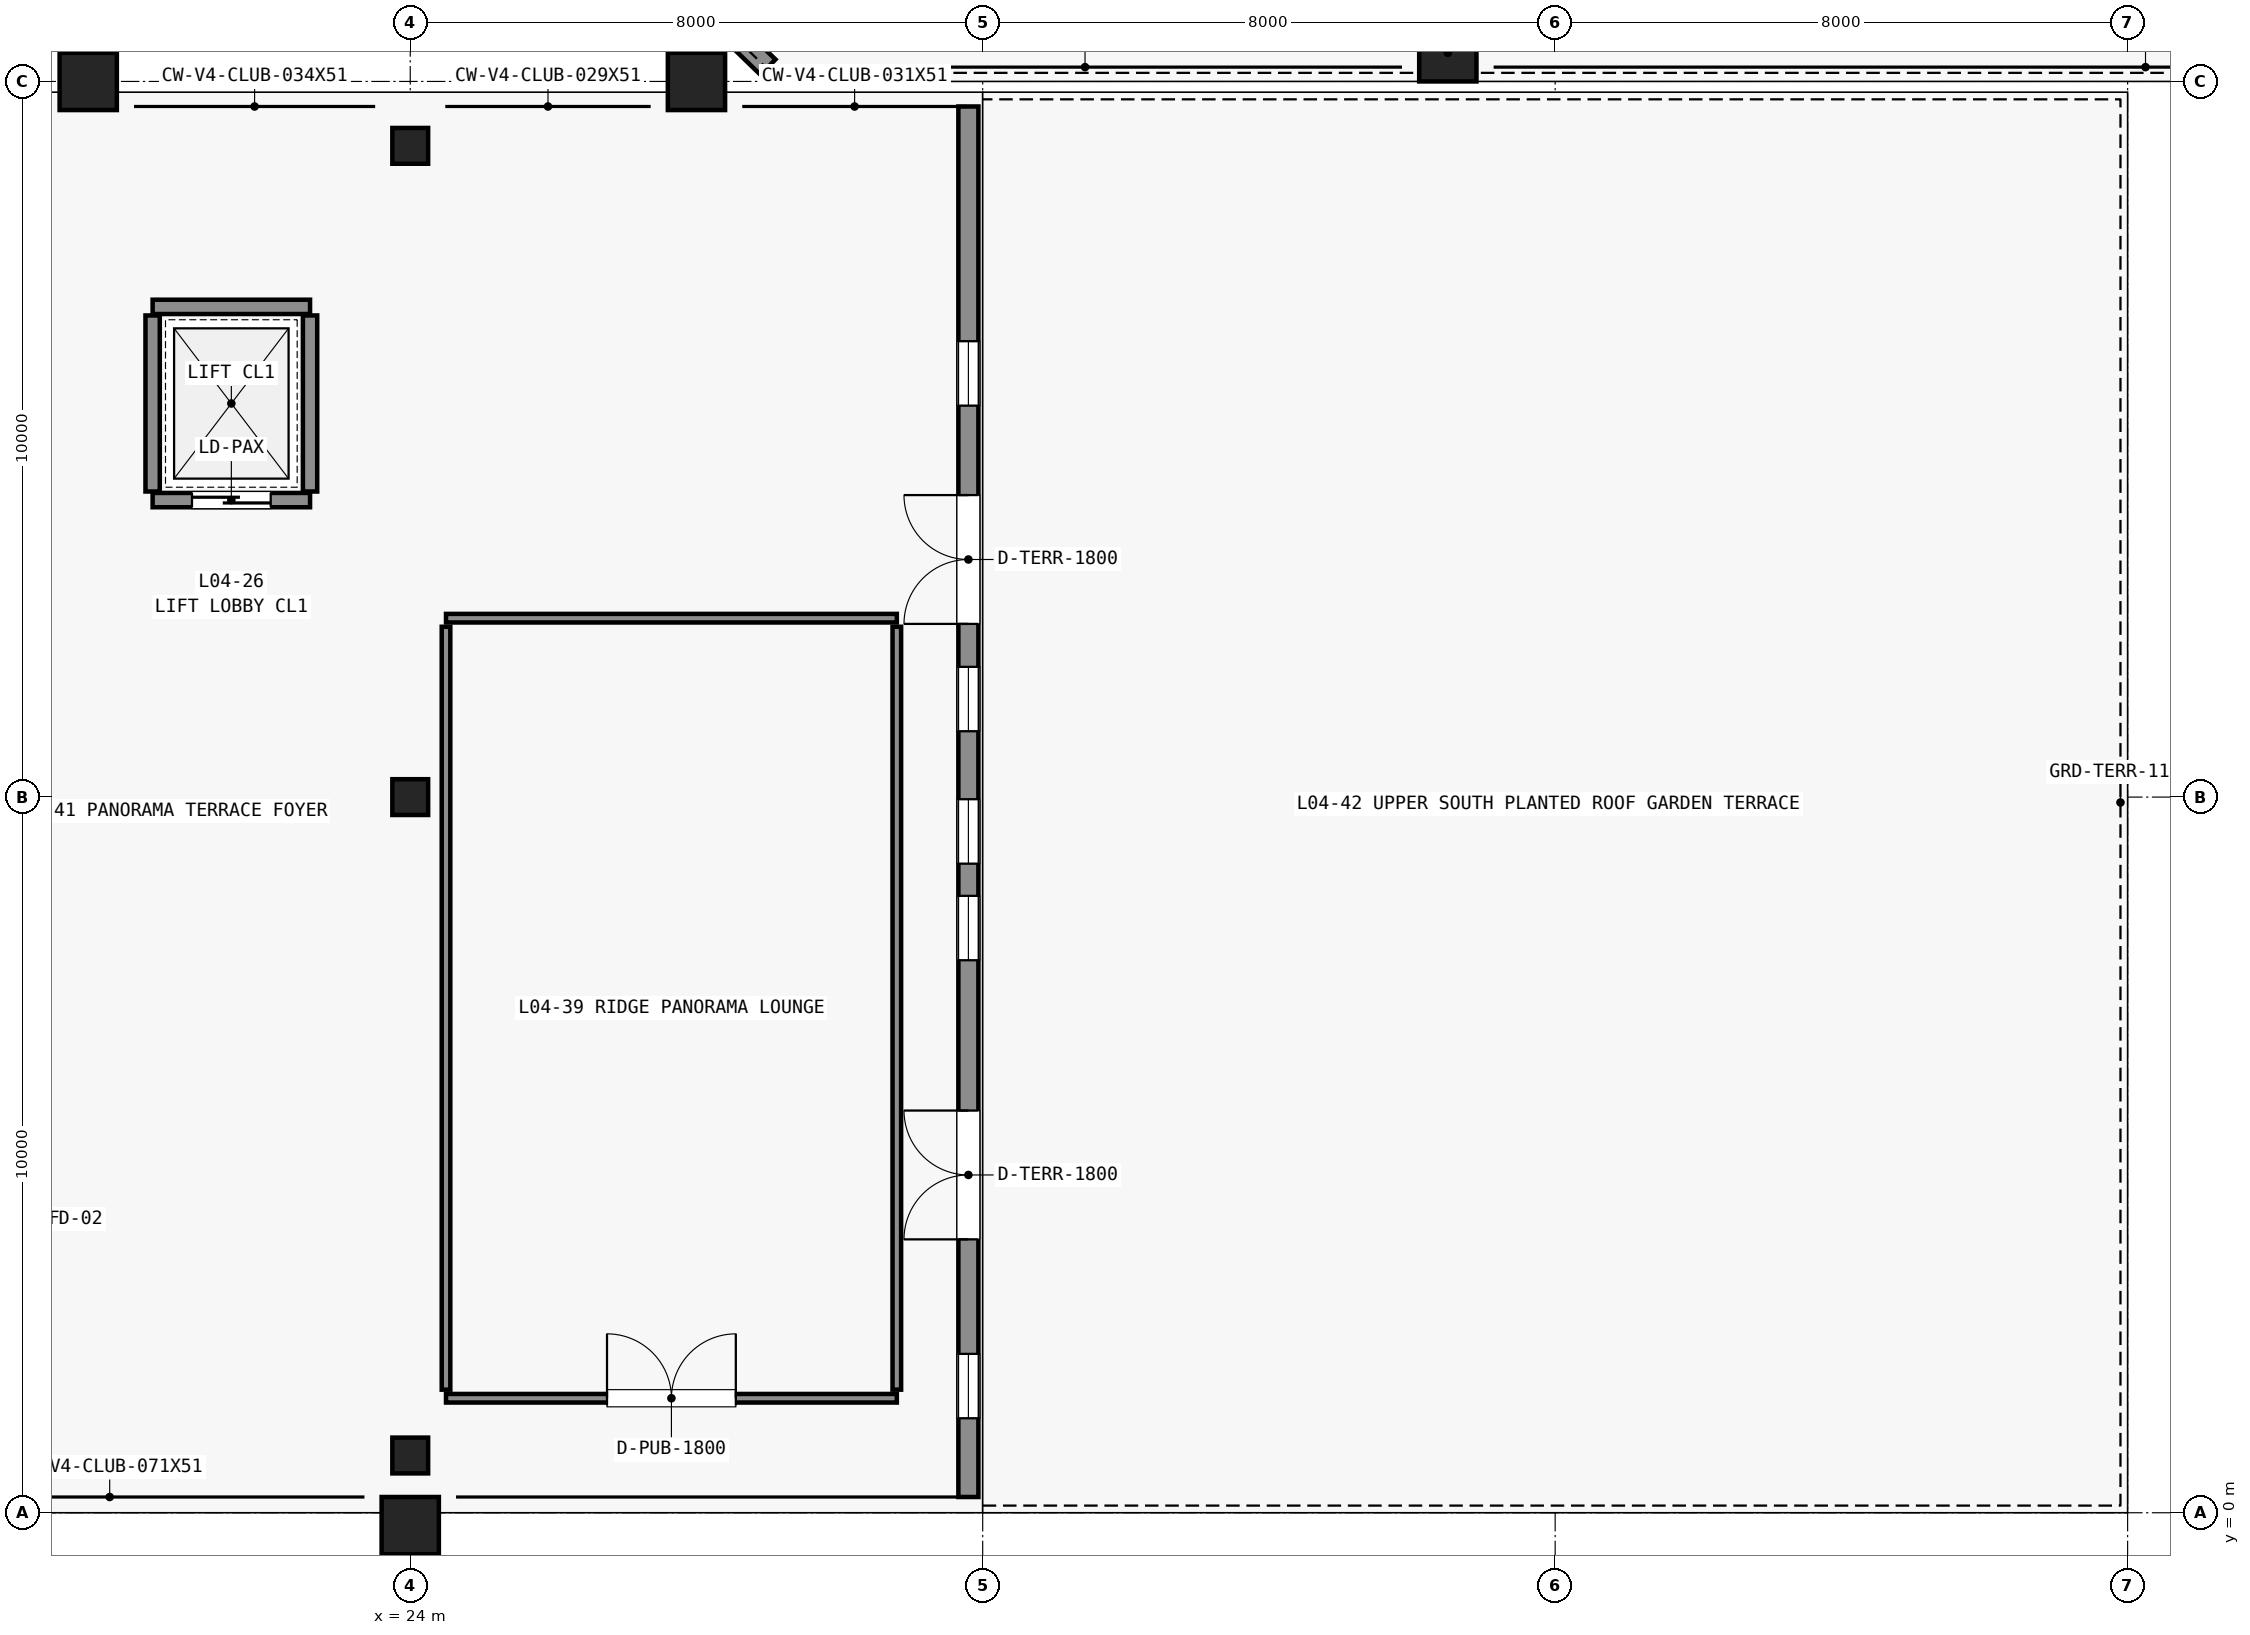
"""IFC4 building model, lengths in metres.
Left out: names, types, materials, properties, quantities, classifications, styles, units other than length and angle.
Written with IfcOpenShell. Run it as: python <this file> out.ifc"""

import sys

from ifc_helpers import new_model, si_unit, direction, frame, frame_2d, origin, origin_2d, place, context, subcontext, project, spatial, rectangle, extrude, element, fill, save


model = new_model("IFC4")
c1 = context("Model", 3, precision=1e-05, world=origin(), true_north=direction((0.0, 1.0)))
c2 = subcontext(c1, "Body", "Model", "MODEL_VIEW")
j1 = project(units=[si_unit("LENGTHUNIT", "METRE"), si_unit("PLANEANGLEUNIT", "RADIAN")], contexts=[c1])
p1 = place(None, origin())
s1 = spatial("IfcSite", under=j1, at=p1, CompositionType="ELEMENT")
p2 = place(p1, origin())
s2 = spatial("IfcBuilding", under=s1, at=p2, CompositionType="ELEMENT")
p3 = place(p2, frame((0.0, 0.0, 21.0)))
s3 = spatial("IfcBuildingStorey", under=s2, at=p3, CompositionType="ELEMENT", Elevation=21.0)
p4 = place(p3, frame((38.5, 20.4, 0.0), z_axis=(0.0, 0.0, 1.0), x_axis=(1.0, 0.0, 0.0)))
e1 = element("IfcColumn", 1, at=p4, inside=s3, PredefinedType="PILASTER", context=c2, shape_type="SweptSolid", body=[
    extrude(rectangle(XDim=0.8, YDim=0.8, at=origin_2d()), origin(), (0.0, 0.0, 1.0), 5.06),
])
for number, where, z_axis, x_axis in (
    (2, (24.0, -0.18, 0.0), (0.0, 0.0, 1.0), (1.0, 0.0, 0.0)),
    (3, (19.5, 20.0, 0.0), (0.0, 0.0, 1.0), (1.0, 0.0, 0.0)),
    (4, (28.0, 20.0, 0.0), (0.0, 0.0, 1.0), (1.0, 0.0, 0.0)),
):
    element("IfcColumn", number, at=place(p3, frame(where, z_axis=z_axis, x_axis=x_axis)), inside=s3, PredefinedType="PILASTER", context=c2, shape_type="SweptSolid", body=[
        extrude(rectangle(XDim=0.8, YDim=0.8, at=origin_2d()), origin(), (0.0, 0.0, 1.0), 5.08),
    ])
for number, where, z_axis, x_axis in (
    (5, (24.0, 0.8, 0.0), (0.0, 0.0, 1.0), (1.0, 0.0, 0.0)),
    (6, (24.0, 10.0, 0.0), (0.0, 0.0, 1.0), (1.0, 0.0, 0.0)),
    (7, (24.0, 19.1, 0.0), (0.0, 0.0, 1.0), (1.0, 0.0, 0.0)),
):
    element("IfcColumn", number, at=place(p3, frame(where, z_axis=z_axis, x_axis=x_axis)), inside=s3, PredefinedType="COLUMN", context=c2, shape_type="SweptSolid", body=[
        extrude(rectangle(XDim=0.5, YDim=0.5, at=origin_2d()), origin(), (0.0, 0.0, 1.0), 5.08),
    ])
p5 = place(p3, frame((20.4, 14.15, 0.0), z_axis=(0.0, 0.0, 1.0), x_axis=(1.0, 0.0, 0.0)))
e8 = element("IfcWall", 8, at=p5, inside=s3, PredefinedType="STANDARD", context=c2, shape_type="SweptSolid", body=[
    extrude(rectangle(XDim=2.2, YDim=0.2, at=frame_2d((1.1, 0.0))), origin(), (0.0, 0.0, 1.0), 5.08),
])
p6 = place(p5, frame((0.55, 0.0, 0.0)))
e9 = element("IfcOpeningElement", 9, at=p6, cuts=e8, PredefinedType="OPENING", context=c2, shape_type="SweptSolid", body=[
    extrude(rectangle(XDim=1.1, YDim=2.15, at=frame_2d((0.55, 1.075))), frame((0.0, 0.11, 0.0), z_axis=(0.0, -1.0, 0.0), x_axis=(1.0, 0.0, 0.0)), (0.0, 0.0, 1.0), 0.22),
])
p7 = place(p3, frame((20.4, 16.85, 0.0), z_axis=(0.0, 0.0, 1.0), x_axis=(1.0, 0.0, 0.0)))
e10 = element("IfcWall", 10, at=p7, inside=s3, PredefinedType="STANDARD", context=c2, shape_type="SweptSolid", body=[
    extrude(rectangle(XDim=2.2, YDim=0.2, at=frame_2d((1.1, 0.0))), origin(), (0.0, 0.0, 1.0), 5.08),
])
for number, where, z_axis, x_axis in (
    (11, (20.4, 14.27, 0.0), (0.0, 0.0, 1.0), (0.0, 1.0, 0.0)),
    (12, (22.6, 14.27, 0.0), (0.0, 0.0, 1.0), (0.0, 1.0, 0.0)),
):
    element("IfcWall", number, at=place(p3, frame(where, z_axis=z_axis, x_axis=x_axis)), inside=s3, PredefinedType="STANDARD", context=c2, shape_type="SweptSolid", body=[
        extrude(rectangle(XDim=2.46, YDim=0.2, at=frame_2d((1.23, 0.0))), origin(), (0.0, 0.0, 1.0), 5.08),
    ])
p8 = place(p3, frame((16.2, 32.6, 0.0), z_axis=(0.0, 0.0, 1.0), x_axis=(0.718237441527, -0.695798086796, 0.0)))
e13 = element("IfcWall", 13, at=p8, inside=s3, PredefinedType="STANDARD", context=c2, shape_type="SweptSolid", body=[
    extrude(rectangle(XDim=17.822, YDim=0.3, at=frame_2d((8.911, 0.0))), origin(), (0.0, 0.0, 1.0), 4.21),
])
p9 = place(p8, frame((1.1, 0.0, 0.95)))
e14 = element("IfcOpeningElement", 14, at=p9, cuts=e13, PredefinedType="OPENING", context=c2, shape_type="SweptSolid", body=[
    extrude(rectangle(XDim=0.9, YDim=2.85, at=frame_2d((0.45, 1.425))), frame((0.0, 0.16, 0.0), z_axis=(0.0, -1.0, 0.0), x_axis=(1.0, 0.0, 0.0)), (0.0, 0.0, 1.0), 0.32),
])
p10 = place(p8, frame((2.45, 0.0, 0.95)))
e15 = element("IfcOpeningElement", 15, at=p10, cuts=e13, PredefinedType="OPENING", context=c2, shape_type="SweptSolid", body=[
    extrude(rectangle(XDim=0.9, YDim=2.85, at=frame_2d((0.45, 1.425))), frame((0.0, 0.16, 0.0), z_axis=(0.0, -1.0, 0.0), x_axis=(1.0, 0.0, 0.0)), (0.0, 0.0, 1.0), 0.32),
])
p11 = place(p8, frame((4.3, 0.0, 0.95)))
e16 = element("IfcOpeningElement", 16, at=p11, cuts=e13, PredefinedType="OPENING", context=c2, shape_type="SweptSolid", body=[
    extrude(rectangle(XDim=0.9, YDim=2.85, at=frame_2d((0.45, 1.425))), frame((0.0, 0.16, 0.0), z_axis=(0.0, -1.0, 0.0), x_axis=(1.0, 0.0, 0.0)), (0.0, 0.0, 1.0), 0.32),
])
p12 = place(p8, frame((5.65, 0.0, 0.95)))
e17 = element("IfcOpeningElement", 17, at=p12, cuts=e13, PredefinedType="OPENING", context=c2, shape_type="SweptSolid", body=[
    extrude(rectangle(XDim=0.9, YDim=2.85, at=frame_2d((0.45, 1.425))), frame((0.0, 0.16, 0.0), z_axis=(0.0, -1.0, 0.0), x_axis=(1.0, 0.0, 0.0)), (0.0, 0.0, 1.0), 0.32),
])
p13 = place(p8, frame((7.5, 0.0, 0.95)))
e18 = element("IfcOpeningElement", 18, at=p13, cuts=e13, PredefinedType="OPENING", context=c2, shape_type="SweptSolid", body=[
    extrude(rectangle(XDim=0.9, YDim=2.85, at=frame_2d((0.45, 1.425))), frame((0.0, 0.16, 0.0), z_axis=(0.0, -1.0, 0.0), x_axis=(1.0, 0.0, 0.0)), (0.0, 0.0, 1.0), 0.32),
])
p14 = place(p8, frame((8.85, 0.0, 0.95)))
e19 = element("IfcOpeningElement", 19, at=p14, cuts=e13, PredefinedType="OPENING", context=c2, shape_type="SweptSolid", body=[
    extrude(rectangle(XDim=0.9, YDim=2.85, at=frame_2d((0.45, 1.425))), frame((0.0, 0.16, 0.0), z_axis=(0.0, -1.0, 0.0), x_axis=(1.0, 0.0, 0.0)), (0.0, 0.0, 1.0), 0.32),
])
p15 = place(p8, frame((10.7, 0.0, 0.95)))
e20 = element("IfcOpeningElement", 20, at=p15, cuts=e13, PredefinedType="OPENING", context=c2, shape_type="SweptSolid", body=[
    extrude(rectangle(XDim=0.9, YDim=2.85, at=frame_2d((0.45, 1.425))), frame((0.0, 0.16, 0.0), z_axis=(0.0, -1.0, 0.0), x_axis=(1.0, 0.0, 0.0)), (0.0, 0.0, 1.0), 0.32),
])
p16 = place(p8, frame((12.05, 0.0, 0.95)))
e21 = element("IfcOpeningElement", 21, at=p16, cuts=e13, PredefinedType="OPENING", context=c2, shape_type="SweptSolid", body=[
    extrude(rectangle(XDim=0.9, YDim=2.85, at=frame_2d((0.45, 1.425))), frame((0.0, 0.16, 0.0), z_axis=(0.0, -1.0, 0.0), x_axis=(1.0, 0.0, 0.0)), (0.0, 0.0, 1.0), 0.32),
])
p17 = place(p8, frame((13.9, 0.0, 0.95)))
e22 = element("IfcOpeningElement", 22, at=p17, cuts=e13, PredefinedType="OPENING", context=c2, shape_type="SweptSolid", body=[
    extrude(rectangle(XDim=0.9, YDim=2.85, at=frame_2d((0.45, 1.425))), frame((0.0, 0.16, 0.0), z_axis=(0.0, -1.0, 0.0), x_axis=(1.0, 0.0, 0.0)), (0.0, 0.0, 1.0), 0.32),
])
p18 = place(p8, frame((15.25, 0.0, 0.95)))
e23 = element("IfcOpeningElement", 23, at=p18, cuts=e13, PredefinedType="OPENING", context=c2, shape_type="SweptSolid", body=[
    extrude(rectangle(XDim=0.9, YDim=2.85, at=frame_2d((0.45, 1.425))), frame((0.0, 0.16, 0.0), z_axis=(0.0, -1.0, 0.0), x_axis=(1.0, 0.0, 0.0)), (0.0, 0.0, 1.0), 0.32),
])
p19 = place(p3, frame((31.8, 0.22, 0.0), z_axis=(0.0, 0.0, 1.0), x_axis=(0.0, 1.0, 0.0)))
e24 = element("IfcWall", 24, at=p19, inside=s3, PredefinedType="STANDARD", context=c2, shape_type="SweptSolid", body=[
    extrude(rectangle(XDim=19.43, YDim=0.28, at=frame_2d((9.715, 0.0))), origin(), (0.0, 0.0, 1.0), 5.08),
])
p20 = place(p19, frame((3.6, 0.0, 0.0)))
e25 = element("IfcOpeningElement", 25, at=p20, cuts=e24, PredefinedType="OPENING", context=c2, shape_type="SweptSolid", body=[
    extrude(rectangle(XDim=1.8, YDim=2.3, at=frame_2d((0.9, 1.15))), frame((0.0, 0.15, 0.0), z_axis=(0.0, -1.0, 0.0), x_axis=(1.0, 0.0, 0.0)), (0.0, 0.0, 1.0), 0.3),
])
p21 = place(p19, frame((12.2, 0.0, 0.0)))
e26 = element("IfcOpeningElement", 26, at=p21, cuts=e24, PredefinedType="OPENING", context=c2, shape_type="SweptSolid", body=[
    extrude(rectangle(XDim=1.8, YDim=2.3, at=frame_2d((0.9, 1.15))), frame((0.0, 0.15, 0.0), z_axis=(0.0, -1.0, 0.0), x_axis=(1.0, 0.0, 0.0)), (0.0, 0.0, 1.0), 0.3),
])
p22 = place(p19, frame((1.1, 0.0, 0.95)))
e27 = element("IfcOpeningElement", 27, at=p22, cuts=e24, PredefinedType="OPENING", context=c2, shape_type="SweptSolid", body=[
    extrude(rectangle(XDim=0.9, YDim=2.85, at=frame_2d((0.45, 1.425))), frame((0.0, 0.15, 0.0), z_axis=(0.0, -1.0, 0.0), x_axis=(1.0, 0.0, 0.0)), (0.0, 0.0, 1.0), 0.3),
])
p23 = place(p19, frame((7.5, 0.0, 0.95)))
e28 = element("IfcOpeningElement", 28, at=p23, cuts=e24, PredefinedType="OPENING", context=c2, shape_type="SweptSolid", body=[
    extrude(rectangle(XDim=0.9, YDim=2.85, at=frame_2d((0.45, 1.425))), frame((0.0, 0.15, 0.0), z_axis=(0.0, -1.0, 0.0), x_axis=(1.0, 0.0, 0.0)), (0.0, 0.0, 1.0), 0.3),
])
p24 = place(p19, frame((8.85, 0.0, 0.95)))
e29 = element("IfcOpeningElement", 29, at=p24, cuts=e24, PredefinedType="OPENING", context=c2, shape_type="SweptSolid", body=[
    extrude(rectangle(XDim=0.9, YDim=2.85, at=frame_2d((0.45, 1.425))), frame((0.0, 0.15, 0.0), z_axis=(0.0, -1.0, 0.0), x_axis=(1.0, 0.0, 0.0)), (0.0, 0.0, 1.0), 0.3),
])
p25 = place(p19, frame((10.7, 0.0, 0.95)))
e30 = element("IfcOpeningElement", 30, at=p25, cuts=e24, PredefinedType="OPENING", context=c2, shape_type="SweptSolid", body=[
    extrude(rectangle(XDim=0.9, YDim=2.85, at=frame_2d((0.45, 1.425))), frame((0.0, 0.15, 0.0), z_axis=(0.0, -1.0, 0.0), x_axis=(1.0, 0.0, 0.0)), (0.0, 0.0, 1.0), 0.3),
])
p26 = place(p19, frame((15.25, 0.0, 0.95)))
e31 = element("IfcOpeningElement", 31, at=p26, cuts=e24, PredefinedType="OPENING", context=c2, shape_type="SweptSolid", body=[
    extrude(rectangle(XDim=0.9, YDim=2.85, at=frame_2d((0.45, 1.425))), frame((0.0, 0.15, 0.0), z_axis=(0.0, -1.0, 0.0), x_axis=(1.0, 0.0, 0.0)), (0.0, 0.0, 1.0), 0.3),
])
p27 = place(p3, frame((24.5, 1.6, 0.0), z_axis=(0.0, 0.0, 1.0), x_axis=(1.0, 0.0, 0.0)))
e32 = element("IfcWall", 32, at=p27, inside=s3, PredefinedType="PARTITIONING", context=c2, shape_type="SweptSolid", body=[
    extrude(rectangle(XDim=6.3, YDim=0.12, at=frame_2d((3.15, 0.0))), origin(), (0.0, 0.0, 1.0), 4.33),
])
p28 = place(p27, frame((2.25, 0.0, 0.0)))
e33 = element("IfcOpeningElement", 33, at=p28, cuts=e32, PredefinedType="OPENING", context=c2, shape_type="SweptSolid", body=[
    extrude(rectangle(XDim=1.8, YDim=2.35, at=frame_2d((0.9, 1.175))), frame((0.0, 0.07, 0.0), z_axis=(0.0, -1.0, 0.0), x_axis=(1.0, 0.0, 0.0)), (0.0, 0.0, 1.0), 0.14),
])
p29 = place(p3, frame((24.5, 12.5, 0.0), z_axis=(0.0, 0.0, 1.0), x_axis=(1.0, 0.0, 0.0)))
e34 = element("IfcWall", 34, at=p29, inside=s3, PredefinedType="PARTITIONING", context=c2, shape_type="SweptSolid", body=[
    extrude(rectangle(XDim=6.3, YDim=0.12, at=frame_2d((3.15, 0.0))), origin(), (0.0, 0.0, 1.0), 4.33),
])
p30 = place(p3, frame((24.5, 1.72, 0.0), z_axis=(0.0, 0.0, 1.0), x_axis=(0.0, 1.0, 0.0)))
e35 = element("IfcWall", 35, at=p30, inside=s3, PredefinedType="PARTITIONING", context=c2, shape_type="SweptSolid", body=[
    extrude(rectangle(XDim=10.66, YDim=0.12, at=frame_2d((5.33, 0.0))), origin(), (0.0, 0.0, 1.0), 4.33),
])
p31 = place(p3, frame((30.8, 1.72, 0.0), z_axis=(0.0, 0.0, 1.0), x_axis=(0.0, 1.0, 0.0)))
e36 = element("IfcWall", 36, at=p31, inside=s3, PredefinedType="PARTITIONING", context=c2, shape_type="SweptSolid", body=[
    extrude(rectangle(XDim=10.66, YDim=0.12, at=frame_2d((5.33, 0.0))), origin(), (0.0, 0.0, 1.0), 5.08),
])
p32 = place(p6, origin())
e37 = element("IfcDoor", 37, at=p32, inside=s3, OperationType="SLIDING_TO_LEFT", PredefinedType="DOOR", context=c2, shape_type="SweptSolid", body=[
    extrude(rectangle(XDim=1.1, YDim=2.15, at=frame_2d((0.55, 1.075))), frame((0.0, 0.025, 0.0), z_axis=(0.0, -1.0, 0.0), x_axis=(1.0, 0.0, 0.0)), (0.0, 0.0, 1.0), 0.05),
])
fill(e9, e37)
p33 = place(p20, origin())
e38 = element("IfcDoor", 38, at=p33, inside=s3, OperationType="DOUBLE_DOOR_SINGLE_SWING", PredefinedType="DOOR", context=c2, shape_type="SweptSolid", body=[
    extrude(rectangle(XDim=1.8, YDim=2.3, at=frame_2d((0.9, 1.15))), frame((0.0, 0.025, 0.0), z_axis=(0.0, -1.0, 0.0), x_axis=(1.0, 0.0, 0.0)), (0.0, 0.0, 1.0), 0.05),
])
fill(e25, e38)
p34 = place(p21, origin())
e39 = element("IfcDoor", 39, at=p34, inside=s3, OperationType="DOUBLE_DOOR_SINGLE_SWING", PredefinedType="DOOR", context=c2, shape_type="SweptSolid", body=[
    extrude(rectangle(XDim=1.8, YDim=2.3, at=frame_2d((0.9, 1.15))), frame((0.0, 0.025, 0.0), z_axis=(0.0, -1.0, 0.0), x_axis=(1.0, 0.0, 0.0)), (0.0, 0.0, 1.0), 0.05),
])
fill(e26, e39)
p35 = place(p22, origin())
e40 = element("IfcWindow", 40, at=p35, inside=s3, PartitioningType="DOUBLE_PANEL_VERTICAL", PredefinedType="WINDOW", context=c2, shape_type="SweptSolid", body=[
    extrude(rectangle(XDim=0.9, YDim=2.85, at=frame_2d((0.45, 1.425))), frame((0.0, 0.03, 0.0), z_axis=(0.0, -1.0, 0.0), x_axis=(1.0, 0.0, 0.0)), (0.0, 0.0, 1.0), 0.06),
])
fill(e27, e40)
p36 = place(p23, origin())
e41 = element("IfcWindow", 41, at=p36, inside=s3, PartitioningType="DOUBLE_PANEL_VERTICAL", PredefinedType="WINDOW", context=c2, shape_type="SweptSolid", body=[
    extrude(rectangle(XDim=0.9, YDim=2.85, at=frame_2d((0.45, 1.425))), frame((0.0, 0.03, 0.0), z_axis=(0.0, -1.0, 0.0), x_axis=(1.0, 0.0, 0.0)), (0.0, 0.0, 1.0), 0.06),
])
fill(e28, e41)
p37 = place(p24, origin())
e42 = element("IfcWindow", 42, at=p37, inside=s3, PartitioningType="DOUBLE_PANEL_VERTICAL", PredefinedType="WINDOW", context=c2, shape_type="SweptSolid", body=[
    extrude(rectangle(XDim=0.9, YDim=2.85, at=frame_2d((0.45, 1.425))), frame((0.0, 0.03, 0.0), z_axis=(0.0, -1.0, 0.0), x_axis=(1.0, 0.0, 0.0)), (0.0, 0.0, 1.0), 0.06),
])
fill(e29, e42)
p38 = place(p25, origin())
e43 = element("IfcWindow", 43, at=p38, inside=s3, PartitioningType="DOUBLE_PANEL_VERTICAL", PredefinedType="WINDOW", context=c2, shape_type="SweptSolid", body=[
    extrude(rectangle(XDim=0.9, YDim=2.85, at=frame_2d((0.45, 1.425))), frame((0.0, 0.03, 0.0), z_axis=(0.0, -1.0, 0.0), x_axis=(1.0, 0.0, 0.0)), (0.0, 0.0, 1.0), 0.06),
])
fill(e30, e43)
p39 = place(p26, origin())
e44 = element("IfcWindow", 44, at=p39, inside=s3, PartitioningType="DOUBLE_PANEL_VERTICAL", PredefinedType="WINDOW", context=c2, shape_type="SweptSolid", body=[
    extrude(rectangle(XDim=0.9, YDim=2.85, at=frame_2d((0.45, 1.425))), frame((0.0, 0.03, 0.0), z_axis=(0.0, -1.0, 0.0), x_axis=(1.0, 0.0, 0.0)), (0.0, 0.0, 1.0), 0.06),
])
fill(e31, e44)
p40 = place(p28, origin())
e45 = element("IfcDoor", 45, at=p40, inside=s3, OperationType="DOUBLE_DOOR_SINGLE_SWING", PredefinedType="DOOR", context=c2, shape_type="SweptSolid", body=[
    extrude(rectangle(XDim=1.8, YDim=2.35, at=frame_2d((0.9, 1.175))), frame((0.0, 0.025, 0.0), z_axis=(0.0, -1.0, 0.0), x_axis=(1.0, 0.0, 0.0)), (0.0, 0.0, 1.0), 0.05),
])
fill(e33, e45)
save(model, sys.argv[1])
